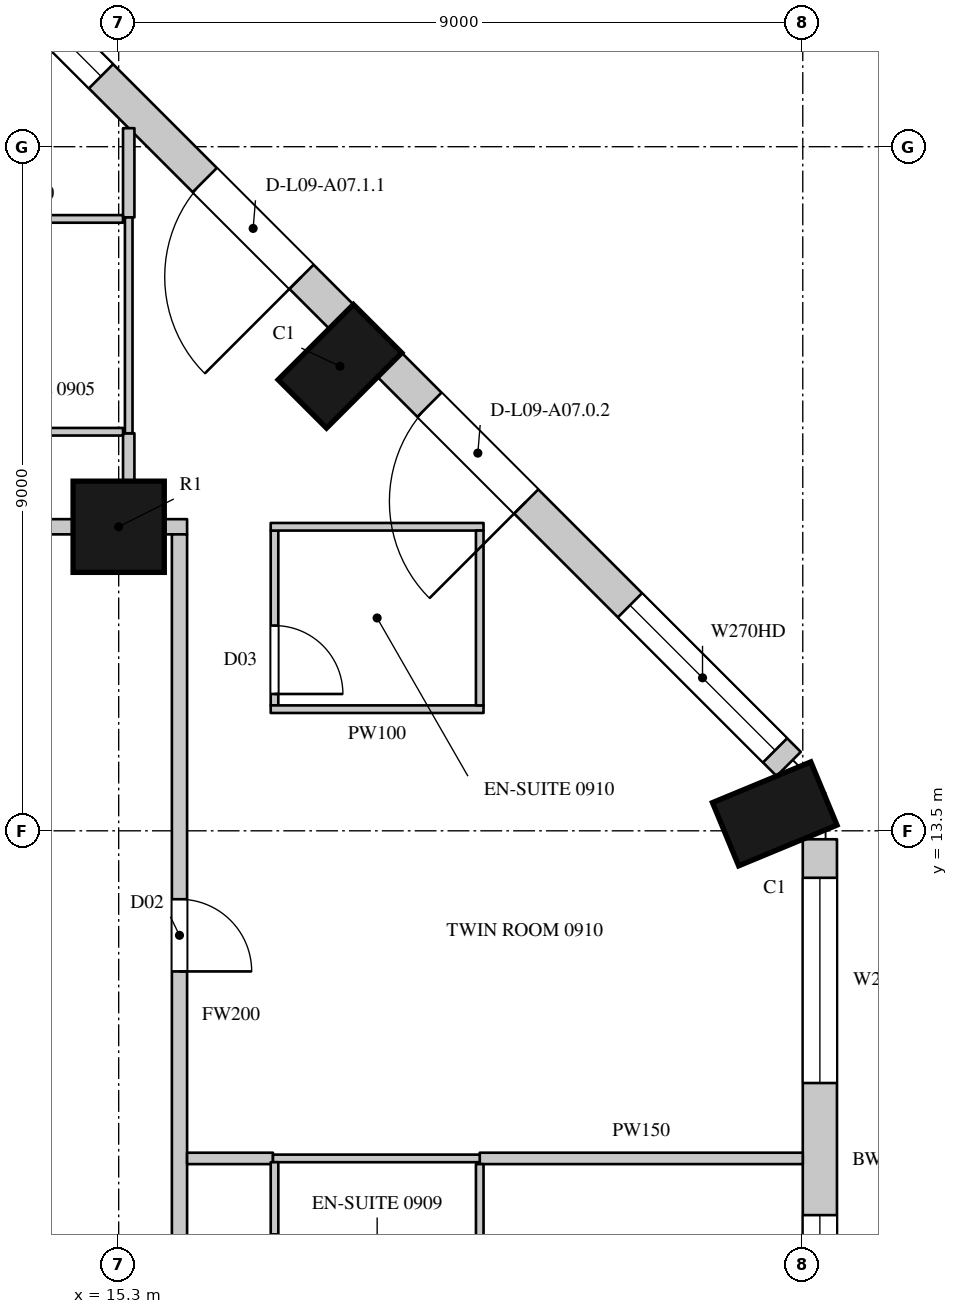
"""IFC4 building model, lengths in metres.
Left out: names, types, materials, properties, quantities, classifications, styles, units other than length and angle.
Written with IfcOpenShell. Run it as: python <this file> out.ifc"""

import sys

from ifc_helpers import new_model, si_unit, direction, frame, frame_2d, origin, origin_2d, place, context, subcontext, project, spatial, rectangle, circle, extrude, element, fill, save


model = new_model("IFC4")
c1 = context("Model", 3, precision=1e-05, world=origin(), true_north=direction((0.0, 1.0)))
c2 = subcontext(c1, "Body", "Model", "MODEL_VIEW")
j1 = project(units=[si_unit("LENGTHUNIT", "METRE"), si_unit("PLANEANGLEUNIT", "RADIAN")], contexts=[c1])
p1 = place(None, origin())
s1 = spatial("IfcSite", under=j1, at=p1, CompositionType="ELEMENT")
p2 = place(p1, origin())
s2 = spatial("IfcBuilding", under=s1, at=p2, CompositionType="ELEMENT")
p3 = place(p2, frame((0.0, 0.0, 62.7)))
s3 = spatial("IfcBuildingStorey", under=s2, at=p3, CompositionType="ELEMENT", Elevation=62.7)
for number, where, z_axis, x_axis in (
    (1, (23.931, 13.723, 0.0), (0.0, 0.0, 1.0), (-0.383, 0.924, 0.0)),
    (2, (18.211, 19.611, 0.0), (0.0, 0.0, 1.0), (-0.707, 0.707, 0.0)),
):
    element("IfcColumn", number, at=place(p3, frame(where, z_axis=z_axis, x_axis=x_axis)), inside=s3, PredefinedType="COLUMN", context=c2, shape_type="SweptSolid", body=[
        extrude(rectangle(XDim=0.9, YDim=1.4, at=origin_2d()), origin(), (0.0, 0.0, 1.0), 3.6),
    ])
p4 = place(p3, frame((15.3, 17.5, 0.0), z_axis=(0.0, 0.0, 1.0), x_axis=(1.0, 0.0, 0.0)))
e3 = element("IfcColumn", 3, at=p4, inside=s3, PredefinedType="COLUMN", context=c2, shape_type="SweptSolid", body=[
    extrude(circle(Radius=0.6, at=origin_2d()), origin(), (0.0, 0.0, 1.0), 3.6),
])
p5 = place(p3, frame((24.525, 4.95, 0.0), z_axis=(0.0, 0.0, 1.0), x_axis=(0.0, 1.0, 0.0)))
e4 = element("IfcWall", 4, at=p5, inside=s3, PredefinedType="SOLIDWALL", context=c2, shape_type="SweptSolid", body=[
    extrude(rectangle(XDim=8.439, YDim=0.45, at=frame_2d((4.219, 0.0))), origin(), (0.0, 0.0, 1.0), 3.3),
])
p6 = place(p5, frame((0.294, 0.0, 0.0)))
e5 = element("IfcOpeningElement", 5, at=p6, cuts=e4, PredefinedType="OPENING", context=c2, shape_type="SweptSolid", body=[
    extrude(rectangle(XDim=1.8, YDim=2.4, at=frame_2d((0.9, 1.2))), frame((0.0, 0.235, 0.0), z_axis=(0.0, -1.0, 0.0), x_axis=(1.0, 0.0, 0.0)), (0.0, 0.0, 1.0), 0.47),
])
p7 = place(p5, frame((2.294, 0.0, 1.05)))
e6 = element("IfcOpeningElement", 6, at=p7, cuts=e4, PredefinedType="OPENING", context=c2, shape_type="SweptSolid", body=[
    extrude(rectangle(XDim=1.2, YDim=2.0, at=frame_2d((0.6, 1.0))), frame((0.0, 0.235, 0.0), z_axis=(0.0, -1.0, 0.0), x_axis=(1.0, 0.0, 0.0)), (0.0, 0.0, 1.0), 0.47),
])
p8 = place(p5, frame((5.232, 0.0, 1.05)))
e7 = element("IfcOpeningElement", 7, at=p8, cuts=e4, PredefinedType="OPENING", context=c2, shape_type="SweptSolid", body=[
    extrude(rectangle(XDim=2.7, YDim=2.0, at=frame_2d((1.35, 1.0))), frame((0.0, 0.235, 0.0), z_axis=(0.0, -1.0, 0.0), x_axis=(1.0, 0.0, 0.0)), (0.0, 0.0, 1.0), 0.47),
])
p9 = place(p3, frame((24.115, 14.379, 0.0), z_axis=(0.0, 0.0, 1.0), x_axis=(-0.707106781187, 0.707106781187, 0.0)))
e8 = element("IfcWall", 8, at=p9, inside=s3, PredefinedType="SOLIDWALL", context=c2, shape_type="SweptSolid", body=[
    extrude(rectangle(XDim=7.424, YDim=0.45, at=frame_2d((3.712, 0.0))), origin(), (0.0, 0.0, 1.0), 3.3),
])
p10 = place(p9, frame((0.253, 0.0, 1.05)))
e9 = element("IfcOpeningElement", 9, at=p10, cuts=e8, PredefinedType="OPENING", context=c2, shape_type="SweptSolid", body=[
    extrude(rectangle(XDim=2.7, YDim=2.0, at=frame_2d((1.35, 1.0))), frame((0.0, 0.235, 0.0), z_axis=(0.0, -1.0, 0.0), x_axis=(1.0, 0.0, 0.0)), (0.0, 0.0, 1.0), 0.47),
])
p11 = place(p9, frame((4.884, 0.0, 0.0)))
e10 = element("IfcOpeningElement", 10, at=p11, cuts=e8, PredefinedType="OPENING", context=c2, shape_type="SweptSolid", body=[
    extrude(rectangle(XDim=1.8, YDim=2.4, at=frame_2d((0.9, 1.2))), frame((0.0, 0.235, 0.0), z_axis=(0.0, -1.0, 0.0), x_axis=(1.0, 0.0, 0.0)), (0.0, 0.0, 1.0), 0.47),
])
p12 = place(p3, frame((18.229, 20.265, 0.0), z_axis=(0.0, 0.0, 1.0), x_axis=(-0.707106781187, 0.707106781187, 0.0)))
e11 = element("IfcWall", 11, at=p12, inside=s3, PredefinedType="SOLIDWALL", context=c2, shape_type="SweptSolid", body=[
    extrude(rectangle(XDim=7.424, YDim=0.45, at=frame_2d((3.712, 0.0))), origin(), (0.0, 0.0, 1.0), 3.3),
])
p13 = place(p12, frame((0.74, 0.0, 0.0)))
e12 = element("IfcOpeningElement", 12, at=p13, cuts=e11, PredefinedType="OPENING", context=c2, shape_type="SweptSolid", body=[
    extrude(rectangle(XDim=1.8, YDim=2.4, at=frame_2d((0.9, 1.2))), frame((0.0, 0.235, 0.0), z_axis=(0.0, -1.0, 0.0), x_axis=(1.0, 0.0, 0.0)), (0.0, 0.0, 1.0), 0.47),
])
p14 = place(p12, frame((4.471, 0.0, 1.05)))
e13 = element("IfcOpeningElement", 13, at=p14, cuts=e11, PredefinedType="OPENING", context=c2, shape_type="SweptSolid", body=[
    extrude(rectangle(XDim=2.7, YDim=2.0, at=frame_2d((1.35, 1.0))), frame((0.0, 0.235, 0.0), z_axis=(0.0, -1.0, 0.0), x_axis=(1.0, 0.0, 0.0)), (0.0, 0.0, 1.0), 0.47),
])
p15 = place(p3, frame((23.15, 16.864, 0.0), z_axis=(0.0, 0.0, 1.0), x_axis=(-0.707106781187, 0.707106781187, 0.0)))
e14 = element("IfcWall", 14, at=p15, inside=s3, PredefinedType="SOLIDWALL", context=c2, shape_type="SweptSolid", body=[
    extrude(rectangle(XDim=1.445, YDim=0.45, at=frame_2d((0.722, 0.0))), origin(), (0.0, 0.0, 1.0), 0.6),
])
p16 = place(p3, frame((19.937, 20.078, 0.0), z_axis=(0.0, 0.0, 1.0), x_axis=(-0.707106781187, 0.707106781187, 0.0)))
e15 = element("IfcWall", 15, at=p16, inside=s3, PredefinedType="SOLIDWALL", context=c2, shape_type="SweptSolid", body=[
    extrude(rectangle(XDim=1.781, YDim=0.45, at=frame_2d((0.89, 0.0))), origin(), (0.0, 0.0, 1.0), 0.6),
])
p17 = place(p3, frame((16.486, 23.529, 0.0), z_axis=(0.0, 0.0, 1.0), x_axis=(-0.707022305137, 0.707191247145, 0.0)))
e16 = element("IfcWall", 16, at=p17, inside=s3, PredefinedType="SOLIDWALL", context=c2, shape_type="SweptSolid", body=[
    extrude(rectangle(XDim=1.445, YDim=0.45, at=frame_2d((0.723, 0.0))), origin(), (0.0, 0.0, 1.0), 0.6),
])
p18 = place(p3, frame((6.9, 17.5, 0.0), z_axis=(0.0, 0.0, 1.0), x_axis=(1.0, 0.0, 0.0)))
e17 = element("IfcWall", 17, at=p18, inside=s3, PredefinedType="PARTITIONING", context=c2, shape_type="SweptSolid", body=[
    extrude(rectangle(XDim=7.8, YDim=0.2, at=frame_2d((3.9, 0.0))), origin(), (0.0, 0.0, 1.0), 2.75),
])
p19 = place(p18, frame((1.45, 0.0, 0.0)))
e18 = element("IfcOpeningElement", 18, at=p19, cuts=e17, PredefinedType="OPENING", context=c2, shape_type="SweptSolid", body=[
    extrude(rectangle(XDim=1.1, YDim=2.4, at=frame_2d((0.55, 1.2))), frame((0.0, 0.11, 0.0), z_axis=(0.0, -1.0, 0.0), x_axis=(1.0, 0.0, 0.0)), (0.0, 0.0, 1.0), 0.22),
])
p20 = place(p3, frame((15.9, 17.5, 0.0), z_axis=(0.0, 0.0, 1.0), x_axis=(1.0, 0.0, 0.0)))
e19 = element("IfcWall", 19, at=p20, inside=s3, PredefinedType="PARTITIONING", context=c2, shape_type="SweptSolid", body=[
    extrude(rectangle(XDim=0.3, YDim=0.2, at=frame_2d((0.15, 0.0))), origin(), (0.0, 0.0, 1.0), 3.3),
])
p21 = place(p3, frame((16.1, 4.75, 0.0), z_axis=(0.0, 0.0, 1.0), x_axis=(0.0, 1.0, 0.0)))
e20 = element("IfcWall", 20, at=p21, inside=s3, PredefinedType="PARTITIONING", context=c2, shape_type="SweptSolid", body=[
    extrude(rectangle(XDim=12.65, YDim=0.2, at=frame_2d((6.325, 0.0))), origin(), (0.0, 0.0, 1.0), 3.3),
])
p22 = place(p21, frame((0.25, 0.0, 0.0)))
e21 = element("IfcOpeningElement", 21, at=p22, cuts=e20, PredefinedType="OPENING", context=c2, shape_type="SweptSolid", body=[
    extrude(rectangle(XDim=0.95, YDim=2.2, at=frame_2d((0.475, 1.1))), frame((0.0, 0.11, 0.0), z_axis=(0.0, -1.0, 0.0), x_axis=(1.0, 0.0, 0.0)), (0.0, 0.0, 1.0), 0.22),
])
p23 = place(p21, frame((6.9, 0.0, 0.0)))
e22 = element("IfcOpeningElement", 22, at=p23, cuts=e20, PredefinedType="OPENING", context=c2, shape_type="SweptSolid", body=[
    extrude(rectangle(XDim=0.95, YDim=2.2, at=frame_2d((0.475, 1.1))), frame((0.0, 0.11, 0.0), z_axis=(0.0, -1.0, 0.0), x_axis=(1.0, 0.0, 0.0)), (0.0, 0.0, 1.0), 0.22),
])
p24 = place(p3, frame((15.432, 18.094, 0.0), z_axis=(0.0, 0.0, 1.0), x_axis=(0.0, 1.0, 0.0)))
e23 = element("IfcWall", 23, at=p24, inside=s3, PredefinedType="PARTITIONING", context=c2, shape_type="SweptSolid", body=[
    extrude(rectangle(XDim=0.636, YDim=0.15, at=frame_2d((0.318, 0.0))), origin(), (0.0, 0.0, 1.0), 3.3),
])
p25 = place(p3, frame((15.432, 21.57, 0.0), z_axis=(0.0, 0.0, 1.0), x_axis=(0.0, 1.0, 0.0)))
e24 = element("IfcWall", 24, at=p25, inside=s3, PredefinedType="PARTITIONING", context=c2, shape_type="SweptSolid", body=[
    extrude(rectangle(XDim=1.174, YDim=0.15, at=frame_2d((0.587, 0.0))), origin(), (0.0, 0.0, 1.0), 3.3),
])
p26 = place(p3, frame((16.2, 9.19, 0.0), z_axis=(0.0, 0.0, 1.0), x_axis=(1.0, 0.0, 0.0)))
e25 = element("IfcWall", 25, at=p26, inside=s3, PredefinedType="PARTITIONING", context=c2, shape_type="SweptSolid", body=[
    extrude(rectangle(XDim=1.13, YDim=0.15, at=frame_2d((0.565, 0.0))), origin(), (0.0, 0.0, 1.0), 2.65),
])
p27 = place(p3, frame((20.05, 9.19, 0.0), z_axis=(0.0, 0.0, 1.0), x_axis=(1.0, 0.0, 0.0)))
e26 = element("IfcWall", 26, at=p27, inside=s3, PredefinedType="PARTITIONING", context=c2, shape_type="SweptSolid", body=[
    extrude(rectangle(XDim=4.25, YDim=0.15, at=frame_2d((2.125, 0.0))), origin(), (0.0, 0.0, 1.0), 2.65),
])
for number, where, z_axis, x_axis in (
    (27, (12.786, 18.75, 0.0), (0.0, 0.0, 1.0), (1.0, 0.0, 0.0)),
    (28, (12.786, 21.55, 0.0), (0.0, 0.0, 1.0), (1.0, 0.0, 0.0)),
):
    element("IfcWall", number, at=place(p3, frame(where, z_axis=z_axis, x_axis=x_axis)), inside=s3, PredefinedType="PARTITIONING", context=c2, shape_type="SweptSolid", body=[
        extrude(rectangle(XDim=2.571, YDim=0.1, at=frame_2d((1.286, 0.0))), origin(), (0.0, 0.0, 1.0), 3.3),
    ])
p28 = place(p3, frame((15.432, 18.73, 0.0), z_axis=(0.0, 0.0, 1.0), x_axis=(0.0, 1.0, 0.0)))
e29 = element("IfcWall", 29, at=p28, inside=s3, PredefinedType="PARTITIONING", context=c2, shape_type="SweptSolid", body=[
    extrude(rectangle(XDim=2.84, YDim=0.1, at=frame_2d((1.42, 0.0))), origin(), (0.0, 0.0, 1.0), 3.3),
])
p29 = place(p3, frame((17.33, 9.19, 0.0), z_axis=(0.0, 0.0, 1.0), x_axis=(1.0, 0.0, 0.0)))
e30 = element("IfcWall", 30, at=p29, inside=s3, PredefinedType="PARTITIONING", context=c2, shape_type="SweptSolid", body=[
    extrude(rectangle(XDim=2.72, YDim=0.1, at=frame_2d((1.36, 0.0))), origin(), (0.0, 0.0, 1.0), 2.65),
])
p30 = place(p3, frame((17.35, 9.14, 0.0), z_axis=(0.0, 0.0, 1.0), x_axis=(0.000337211244, -0.999999943144, 0.0)))
e31 = element("IfcWall", 31, at=p30, inside=s3, PredefinedType="PARTITIONING", context=c2, shape_type="SweptSolid", body=[
    extrude(rectangle(XDim=2.896, YDim=0.1, at=frame_2d((1.448, 0.0))), origin(), (0.0, 0.0, 1.0), 3.3),
])
p31 = place(p30, frame((0.95, 0.0, 0.0)))
e32 = element("IfcOpeningElement", 32, at=p31, cuts=e31, PredefinedType="OPENING", context=c2, shape_type="SweptSolid", body=[
    extrude(rectangle(XDim=0.9, YDim=2.2, at=frame_2d((0.45, 1.1))), frame((0.0, 0.06, 0.0), z_axis=(0.0, -1.0, 0.0), x_axis=(1.0, 0.0, 0.0)), (0.0, 0.0, 1.0), 0.12),
])
p32 = place(p3, frame((17.35, 15.15, 0.0), z_axis=(0.0, 0.0, 1.0), x_axis=(0.0, 1.0, 0.0)))
e33 = element("IfcWall", 33, at=p32, inside=s3, PredefinedType="PARTITIONING", context=c2, shape_type="SweptSolid", body=[
    extrude(rectangle(XDim=2.3, YDim=0.1, at=frame_2d((1.15, 0.0))), origin(), (0.0, 0.0, 1.0), 3.3),
])
p33 = place(p32, frame((0.15, 0.0, 0.0)))
e34 = element("IfcOpeningElement", 34, at=p33, cuts=e33, PredefinedType="OPENING", context=c2, shape_type="SweptSolid", body=[
    extrude(rectangle(XDim=0.9, YDim=2.2, at=frame_2d((0.45, 1.1))), frame((0.0, 0.06, 0.0), z_axis=(0.0, -1.0, 0.0), x_axis=(1.0, 0.0, 0.0)), (0.0, 0.0, 1.0), 0.12),
])
for number, where, z_axis, x_axis in (
    (35, (17.3, 15.1, 0.0), (0.0, 0.0, 1.0), (1.0, 0.0, 0.0)),
    (36, (17.3, 17.5, 0.0), (0.0, 0.0, 1.0), (1.0, 0.0, 0.0)),
):
    element("IfcWall", number, at=place(p3, frame(where, z_axis=z_axis, x_axis=x_axis)), inside=s3, PredefinedType="PARTITIONING", context=c2, shape_type="SweptSolid", body=[
        extrude(rectangle(XDim=2.8, YDim=0.1, at=frame_2d((1.4, 0.0))), origin(), (0.0, 0.0, 1.0), 3.3),
    ])
p34 = place(p3, frame((20.05, 9.115, 0.0), z_axis=(0.0, 0.0, 1.0), x_axis=(0.000352547131, -0.999999937855, 0.0)))
e37 = element("IfcWall", 37, at=p34, inside=s3, PredefinedType="PARTITIONING", context=c2, shape_type="SweptSolid", body=[
    extrude(rectangle(XDim=2.77, YDim=0.1, at=frame_2d((1.385, 0.0))), origin(), (0.0, 0.0, 1.0), 3.3),
])
p35 = place(p3, frame((20.05, 15.15, 0.0), z_axis=(0.0, 0.0, 1.0), x_axis=(0.0, 1.0, 0.0)))
e38 = element("IfcWall", 38, at=p35, inside=s3, PredefinedType="PARTITIONING", context=c2, shape_type="SweptSolid", body=[
    extrude(rectangle(XDim=2.3, YDim=0.1, at=frame_2d((1.15, 0.0))), origin(), (0.0, 0.0, 1.0), 3.3),
])
p36 = place(p7, origin())
e39 = element("IfcWindow", 39, at=p36, inside=s3, PartitioningType="SINGLE_PANEL", PredefinedType="WINDOW", context=c2, shape_type="SweptSolid", body=[
    extrude(rectangle(XDim=1.2, YDim=2.0, at=frame_2d((0.6, 1.0))), frame((0.0, 0.135, 0.0), z_axis=(0.0, -1.0, 0.0), x_axis=(1.0, 0.0, 0.0)), (0.0, 0.0, 1.0), 0.06),
])
fill(e6, e39)
p37 = place(p8, origin())
e40 = element("IfcWindow", 40, at=p37, inside=s3, PartitioningType="SINGLE_PANEL", PredefinedType="WINDOW", context=c2, shape_type="SweptSolid", body=[
    extrude(rectangle(XDim=2.7, YDim=2.0, at=frame_2d((1.35, 1.0))), frame((0.0, 0.135, 0.0), z_axis=(0.0, -1.0, 0.0), x_axis=(1.0, 0.0, 0.0)), (0.0, 0.0, 1.0), 0.06),
])
fill(e7, e40)
p38 = place(p10, origin())
e41 = element("IfcWindow", 41, at=p38, inside=s3, PartitioningType="SINGLE_PANEL", PredefinedType="WINDOW", context=c2, shape_type="SweptSolid", body=[
    extrude(rectangle(XDim=2.7, YDim=2.0, at=frame_2d((1.35, 1.0))), frame((0.0, 0.135, 0.0), z_axis=(0.0, -1.0, 0.0), x_axis=(1.0, 0.0, 0.0)), (0.0, 0.0, 1.0), 0.06),
])
fill(e9, e41)
p39 = place(p11, origin())
e42 = element("IfcDoor", 42, at=p39, inside=s3, OperationType="SLIDING_TO_LEFT", PredefinedType="DOOR", context=c2, shape_type="SweptSolid", body=[
    extrude(rectangle(XDim=1.8, YDim=2.4, at=frame_2d((0.9, 1.2))), frame((0.0, 0.13, 0.0), z_axis=(0.0, -1.0, 0.0), x_axis=(1.0, 0.0, 0.0)), (0.0, 0.0, 1.0), 0.05),
])
fill(e10, e42)
p40 = place(p13, origin())
e43 = element("IfcDoor", 43, at=p40, inside=s3, OperationType="SLIDING_TO_LEFT", PredefinedType="DOOR", context=c2, shape_type="SweptSolid", body=[
    extrude(rectangle(XDim=1.8, YDim=2.4, at=frame_2d((0.9, 1.2))), frame((0.0, 0.13, 0.0), z_axis=(0.0, -1.0, 0.0), x_axis=(1.0, 0.0, 0.0)), (0.0, 0.0, 1.0), 0.05),
])
fill(e12, e43)
p41 = place(p14, origin())
e44 = element("IfcWindow", 44, at=p41, inside=s3, PartitioningType="SINGLE_PANEL", PredefinedType="WINDOW", context=c2, shape_type="SweptSolid", body=[
    extrude(rectangle(XDim=2.7, YDim=2.0, at=frame_2d((1.35, 1.0))), frame((0.0, 0.135, 0.0), z_axis=(0.0, -1.0, 0.0), x_axis=(1.0, 0.0, 0.0)), (0.0, 0.0, 1.0), 0.06),
])
fill(e13, e44)
p42 = place(p31, origin())
e45 = element("IfcDoor", 45, at=p42, inside=s3, OperationType="SINGLE_SWING_RIGHT", PredefinedType="DOOR", context=c2, shape_type="SweptSolid", body=[
    extrude(rectangle(XDim=0.9, YDim=2.2, at=frame_2d((0.45, 1.1))), frame((0.0, 0.025, 0.0), z_axis=(0.0, -1.0, 0.0), x_axis=(1.0, 0.0, 0.0)), (0.0, 0.0, 1.0), 0.05),
])
fill(e32, e45)
p43 = place(p23, origin())
e46 = element("IfcDoor", 46, at=p43, inside=s3, OperationType="SINGLE_SWING_RIGHT", PredefinedType="DOOR", context=c2, shape_type="SweptSolid", body=[
    extrude(rectangle(XDim=0.95, YDim=2.2, at=frame_2d((0.475, 1.1))), frame((0.0, 0.025, 0.0), z_axis=(0.0, -1.0, 0.0), x_axis=(1.0, 0.0, 0.0)), (0.0, 0.0, 1.0), 0.05),
])
fill(e22, e46)
p44 = place(p33, origin())
e47 = element("IfcDoor", 47, at=p44, inside=s3, OperationType="SINGLE_SWING_RIGHT", PredefinedType="DOOR", context=c2, shape_type="SweptSolid", body=[
    extrude(rectangle(XDim=0.9, YDim=2.2, at=frame_2d((0.45, 1.1))), frame((0.0, 0.025, 0.0), z_axis=(0.0, -1.0, 0.0), x_axis=(1.0, 0.0, 0.0)), (0.0, 0.0, 1.0), 0.05),
])
fill(e34, e47)
save(model, sys.argv[1])
